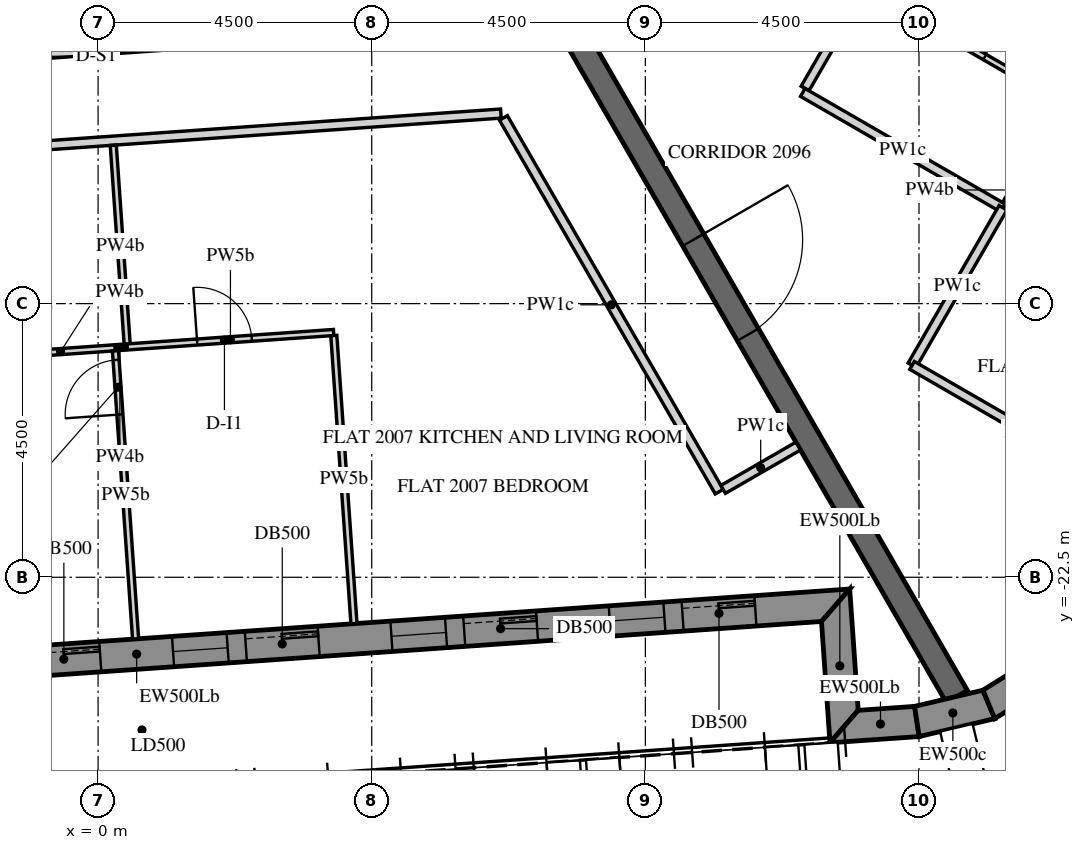
"""IFC4 building model, lengths in metres.
Left out: names, types, materials, properties, quantities, classifications, styles, units other than length and angle.
Written with IfcOpenShell. Run it as: python <this file> out.ifc"""

import sys

from ifc_helpers import new_model, si_unit, direction, frame, frame_2d, origin, place, context, subcontext, project, spatial, polyline, rectangle, outline, extrude, element, fill, save


model = new_model("IFC4")
c1 = context("Model", 3, precision=1e-05, world=origin(), true_north=direction((0.0, 1.0)))
c2 = subcontext(c1, "Body", "Model", "MODEL_VIEW")
j1 = project(units=[si_unit("LENGTHUNIT", "METRE"), si_unit("PLANEANGLEUNIT", "RADIAN")], contexts=[c1])
p1 = place(None, origin())
s1 = spatial("IfcSite", under=j1, at=p1, CompositionType="ELEMENT")
p2 = place(p1, origin())
s2 = spatial("IfcBuilding", under=s1, at=p2, CompositionType="ELEMENT")
p3 = place(p2, frame((0.0, 0.0, 256.2)))
s3 = spatial("IfcBuildingStorey", under=s2, at=p3, CompositionType="ELEMENT", Elevation=256.2)
p4 = place(p3, frame((-10.86, -24.567, 0.0), z_axis=(0.0, 0.0, 1.0), x_axis=(0.997564329317, 0.06975248292, 0.0)))
e1 = element("IfcWall", 1, at=p4, inside=s3, PredefinedType="SOLIDWALL", context=c2, shape_type="SweptSolid", body=[
    extrude(outline(polyline([(0.25, -0.25), (22.795, -0.25), (23.295, 0.25), (-0.25, 0.25), (0.25, -0.25)])), origin(), (0.0, 0.0, 1.0), 3.75),
])
p5 = place(p4, frame((1.323, 0.0, 0.9)))
e2 = element("IfcOpeningElement", 2, at=p5, cuts=e1, PredefinedType="OPENING", context=c2, shape_type="SweptSolid", body=[
    extrude(rectangle(XDim=0.9, YDim=1.5, at=frame_2d((0.45, 0.75))), frame((0.0, 0.26, 0.0), z_axis=(0.0, -1.0, 0.0), x_axis=(1.0, 0.0, 0.0)), (0.0, 0.0, 1.0), 0.52),
])
p6 = place(p4, frame((2.522, 0.0, 0.0)))
e3 = element("IfcOpeningElement", 3, at=p6, cuts=e1, PredefinedType="OPENING", context=c2, shape_type="SweptSolid", body=[
    extrude(rectangle(XDim=1.2, YDim=2.4, at=frame_2d((0.6, 1.2))), frame((0.0, 0.26, 0.0), z_axis=(0.0, -1.0, 0.0), x_axis=(1.0, 0.0, 0.0)), (0.0, 0.0, 1.0), 0.52),
])
p7 = place(p4, frame((4.922, 0.0, 0.9)))
e4 = element("IfcOpeningElement", 4, at=p7, cuts=e1, PredefinedType="OPENING", context=c2, shape_type="SweptSolid", body=[
    extrude(rectangle(XDim=0.9, YDim=1.5, at=frame_2d((0.45, 0.75))), frame((0.0, 0.26, 0.0), z_axis=(0.0, -1.0, 0.0), x_axis=(1.0, 0.0, 0.0)), (0.0, 0.0, 1.0), 0.52),
])
p8 = place(p4, frame((6.122, 0.0, 0.0)))
e5 = element("IfcOpeningElement", 5, at=p8, cuts=e1, PredefinedType="OPENING", context=c2, shape_type="SweptSolid", body=[
    extrude(rectangle(XDim=1.2, YDim=2.4, at=frame_2d((0.6, 1.2))), frame((0.0, 0.26, 0.0), z_axis=(0.0, -1.0, 0.0), x_axis=(1.0, 0.0, 0.0)), (0.0, 0.0, 1.0), 0.52),
])
p9 = place(p4, frame((8.522, 0.0, 0.9)))
e6 = element("IfcOpeningElement", 6, at=p9, cuts=e1, PredefinedType="OPENING", context=c2, shape_type="SweptSolid", body=[
    extrude(rectangle(XDim=0.9, YDim=1.5, at=frame_2d((0.45, 0.75))), frame((0.0, 0.26, 0.0), z_axis=(0.0, -1.0, 0.0), x_axis=(1.0, 0.0, 0.0)), (0.0, 0.0, 1.0), 0.52),
])
p10 = place(p4, frame((9.722, 0.0, 0.0)))
e7 = element("IfcOpeningElement", 7, at=p10, cuts=e1, PredefinedType="OPENING", context=c2, shape_type="SweptSolid", body=[
    extrude(rectangle(XDim=1.2, YDim=2.4, at=frame_2d((0.6, 1.2))), frame((0.0, 0.26, 0.0), z_axis=(0.0, -1.0, 0.0), x_axis=(1.0, 0.0, 0.0)), (0.0, 0.0, 1.0), 0.52),
])
p11 = place(p4, frame((12.122, 0.0, 0.9)))
e8 = element("IfcOpeningElement", 8, at=p11, cuts=e1, PredefinedType="OPENING", context=c2, shape_type="SweptSolid", body=[
    extrude(rectangle(XDim=0.9, YDim=1.5, at=frame_2d((0.45, 0.75))), frame((0.0, 0.26, 0.0), z_axis=(0.0, -1.0, 0.0), x_axis=(1.0, 0.0, 0.0)), (0.0, 0.0, 1.0), 0.52),
])
p12 = place(p4, frame((13.323, 0.0, 0.0)))
e9 = element("IfcOpeningElement", 9, at=p12, cuts=e1, PredefinedType="OPENING", context=c2, shape_type="SweptSolid", body=[
    extrude(rectangle(XDim=1.2, YDim=2.4, at=frame_2d((0.6, 1.2))), frame((0.0, 0.26, 0.0), z_axis=(0.0, -1.0, 0.0), x_axis=(1.0, 0.0, 0.0)), (0.0, 0.0, 1.0), 0.52),
])
p13 = place(p4, frame((15.722, 0.0, 0.9)))
e10 = element("IfcOpeningElement", 10, at=p13, cuts=e1, PredefinedType="OPENING", context=c2, shape_type="SweptSolid", body=[
    extrude(rectangle(XDim=0.9, YDim=1.5, at=frame_2d((0.45, 0.75))), frame((0.0, 0.26, 0.0), z_axis=(0.0, -1.0, 0.0), x_axis=(1.0, 0.0, 0.0)), (0.0, 0.0, 1.0), 0.52),
])
p14 = place(p4, frame((16.922, 0.0, 0.0)))
e11 = element("IfcOpeningElement", 11, at=p14, cuts=e1, PredefinedType="OPENING", context=c2, shape_type="SweptSolid", body=[
    extrude(rectangle(XDim=1.2, YDim=2.4, at=frame_2d((0.6, 1.2))), frame((0.0, 0.26, 0.0), z_axis=(0.0, -1.0, 0.0), x_axis=(1.0, 0.0, 0.0)), (0.0, 0.0, 1.0), 0.52),
])
p15 = place(p4, frame((19.323, 0.0, 0.9)))
e12 = element("IfcOpeningElement", 12, at=p15, cuts=e1, PredefinedType="OPENING", context=c2, shape_type="SweptSolid", body=[
    extrude(rectangle(XDim=0.9, YDim=1.5, at=frame_2d((0.45, 0.75))), frame((0.0, 0.26, 0.0), z_axis=(0.0, -1.0, 0.0), x_axis=(1.0, 0.0, 0.0)), (0.0, 0.0, 1.0), 0.52),
])
p16 = place(p4, frame((20.522, 0.0, 0.0)))
e13 = element("IfcOpeningElement", 13, at=p16, cuts=e1, PredefinedType="OPENING", context=c2, shape_type="SweptSolid", body=[
    extrude(rectangle(XDim=1.2, YDim=2.4, at=frame_2d((0.6, 1.2))), frame((0.0, 0.26, 0.0), z_axis=(0.0, -1.0, 0.0), x_axis=(1.0, 0.0, 0.0)), (0.0, 0.0, 1.0), 0.52),
])
p17 = place(p3, frame((12.129, -22.96, 0.0), z_axis=(0.0, 0.0, 1.0), x_axis=(0.069824268692, -0.99755930726, 0.0)))
e14 = element("IfcWall", 14, at=p17, inside=s3, PredefinedType="SOLIDWALL", context=c2, shape_type="SweptSolid", body=[
    extrude(outline(polyline([(0.25, -0.25), (2.25, -0.25), (1.75, 0.25), (-0.25, 0.25), (0.25, -0.25)])), origin(), (0.0, 0.0, 1.0), 3.75),
])
p18 = place(p3, frame((12.268, -24.955, 0.0), z_axis=(0.0, 0.0, 1.0), x_axis=(0.997561942506, 0.06978660948, 0.0)))
e15 = element("IfcWall", 15, at=p18, inside=s3, PredefinedType="SOLIDWALL", context=c2, shape_type="SweptSolid", body=[
    extrude(outline(polyline([(-0.25, -0.25), (1.22, -0.25), (1.179, 0.25), (0.25, 0.25), (-0.25, -0.25)])), origin(), (0.0, 0.0, 1.0), 3.75),
])
p19 = place(p3, frame((13.465, -24.871, 0.0), z_axis=(0.0, 0.0, 1.0), x_axis=(0.973044740285, 0.230616420501, 0.0)))
e16 = element("IfcWall", 16, at=p19, inside=s3, PredefinedType="SOLIDWALL", context=c2, shape_type="SweptSolid", body=[
    extrude(outline(polyline([(-0.021, -0.25), (1.257, -0.25), (1.175, 0.25), (0.021, 0.25), (-0.021, -0.25)])), origin(), (0.0, 0.0, 1.0), 3.75),
])
p20 = place(p3, frame((14.649, -24.591, 0.0), z_axis=(0.0, 0.0, 1.0), x_axis=(0.848054682072, 0.529908724419, 0.0)))
e17 = element("IfcWall", 17, at=p20, inside=s3, PredefinedType="SOLIDWALL", context=c2, shape_type="SweptSolid", body=[
    extrude(outline(polyline([(-0.041, -0.25), (1.257, -0.25), (1.175, 0.25), (0.041, 0.25), (-0.041, -0.25)])), origin(), (0.0, 0.0, 1.0), 3.75),
])
p21 = place(p3, frame((6.351, -11.0, 0.0), z_axis=(0.0, 0.0, 1.0), x_axis=(0.499998894578, -0.866026041999, 0.0)))
e18 = element("IfcWall", 18, at=p21, inside=s3, PredefinedType="SHEAR", context=c2, shape_type="SweptSolid", body=[
    extrude(rectangle(XDim=15.544, YDim=0.4, at=frame_2d((7.772, 0.0))), origin(), (0.0, 0.0, 1.0), 3.75),
])
p22 = place(p21, frame((6.872, 0.0, 0.0)))
e19 = element("IfcOpeningElement", 19, at=p22, cuts=e18, PredefinedType="OPENING", context=c2, shape_type="SweptSolid", body=[
    extrude(rectangle(XDim=1.8, YDim=2.4, at=frame_2d((0.9, 1.2))), frame((0.0, 0.21, 0.0), z_axis=(0.0, -1.0, 0.0), x_axis=(1.0, 0.0, 0.0)), (0.0, 0.0, 1.0), 0.42),
])
p23 = place(p3, frame((-10.606, -16.079, 0.0), z_axis=(0.0, 0.0, 1.0), x_axis=(0.997563356349, 0.069766396426, 0.0)))
e20 = element("IfcWall", 20, at=p23, inside=s3, PredefinedType="PARTITIONING", context=c2, shape_type="SweptSolid", body=[
    extrude(rectangle(XDim=17.273, YDim=0.15, at=frame_2d((8.636, 0.0))), origin(), (0.0, 0.0, 1.0), 2.823),
])
p24 = place(p23, frame((7.478, 0.0, 0.0)))
e21 = element("IfcOpeningElement", 21, at=p24, cuts=e20, PredefinedType="OPENING", context=c2, shape_type="SweptSolid", body=[
    extrude(rectangle(XDim=1.0, YDim=2.1, at=frame_2d((0.5, 1.05))), frame((0.0, 0.085, 0.0), z_axis=(0.0, -1.0, 0.0), x_axis=(1.0, 0.0, 0.0)), (0.0, 0.0, 1.0), 0.17),
])
p25 = place(p3, frame((6.666, -14.946, 0.0), z_axis=(0.0, 0.0, 1.0), x_axis=(0.499979539361, -0.866037216418, 0.0)))
e22 = element("IfcWall", 22, at=p25, inside=s3, PredefinedType="PARTITIONING", context=c2, shape_type="SweptSolid", body=[
    extrude(rectangle(XDim=7.097, YDim=0.15, at=frame_2d((3.548, 0.0))), origin(), (0.0, 0.0, 1.0), 2.823),
])
p26 = place(p3, frame((10.28, -21.055, 0.0), z_axis=(0.0, 0.0, 1.0), x_axis=(0.866020080793, 0.500009219579, 0.0)))
e23 = element("IfcWall", 23, at=p26, inside=s3, PredefinedType="PARTITIONING", context=c2, shape_type="SweptSolid", body=[
    extrude(rectangle(XDim=1.425, YDim=0.15, at=frame_2d((0.712, 0.0))), origin(), (0.0, 0.0, 1.0), 2.823),
])
p27 = place(p3, frame((7.051, -13.341, 0.0), z_axis=(0.0, 0.0, 1.0), x_axis=(-0.997563599815, -0.069762915103, 0.0)))
e24 = element("IfcWall", 24, at=p27, inside=s3, PredefinedType="PARTITIONING", context=c2, shape_type="SweptSolid", body=[
    extrude(rectangle(XDim=16.952, YDim=0.15, at=frame_2d((8.476, 0.0))), origin(), (0.0, 0.0, 1.0), 2.823),
])
p28 = place(p27, frame((8.026, 0.0, 0.0)))
e25 = element("IfcOpeningElement", 25, at=p28, cuts=e24, PredefinedType="OPENING", context=c2, shape_type="SweptSolid", body=[
    extrude(rectangle(XDim=0.9, YDim=2.1, at=frame_2d((0.45, 1.05))), frame((0.0, 0.085, 0.0), z_axis=(0.0, -1.0, 0.0), x_axis=(1.0, 0.0, 0.0)), (0.0, 0.0, 1.0), 0.17),
])
p29 = place(p3, frame((11.627, -14.462, 0.0), z_axis=(0.0, 0.0, 1.0), x_axis=(0.499994634027, 0.866028501808, 0.0)))
e26 = element("IfcWall", 26, at=p29, inside=s3, PredefinedType="PARTITIONING", context=c2, shape_type="SweptSolid", body=[
    extrude(rectangle(XDim=15.296, YDim=0.15, at=frame_2d((7.648, 0.0))), origin(), (0.0, 0.0, 1.0), 2.823),
])
p30 = place(p29, frame((2.725, 0.0, 0.0)))
e27 = element("IfcOpeningElement", 27, at=p30, cuts=e26, PredefinedType="OPENING", context=c2, shape_type="SweptSolid", body=[
    extrude(rectangle(XDim=1.0, YDim=2.1, at=frame_2d((0.5, 1.05))), frame((0.0, 0.085, 0.0), z_axis=(0.0, -1.0, 0.0), x_axis=(1.0, 0.0, 0.0)), (0.0, 0.0, 1.0), 0.17),
])
p31 = place(p29, frame((13.936, 0.0, 0.0)))
e28 = element("IfcOpeningElement", 28, at=p31, cuts=e26, PredefinedType="OPENING", context=c2, shape_type="SweptSolid", body=[
    extrude(rectangle(XDim=1.0, YDim=2.1, at=frame_2d((0.5, 1.05))), frame((0.0, 0.085, 0.0), z_axis=(0.0, -1.0, 0.0), x_axis=(1.0, 0.0, 0.0)), (0.0, 0.0, 1.0), 0.17),
])
p32 = place(p3, frame((14.88, -16.427, 0.0), z_axis=(0.0, 0.0, 1.0), x_axis=(-0.86601654697, 0.500015340139, 0.0)))
e29 = element("IfcWall", 29, at=p32, inside=s3, PredefinedType="PARTITIONING", context=c2, shape_type="SweptSolid", body=[
    extrude(rectangle(XDim=3.8, YDim=0.15, at=frame_2d((1.9, 0.0))), origin(), (0.0, 0.0, 1.0), 2.823),
])
p33 = place(p3, frame((13.386, -19.014, 0.0), z_axis=(0.0, 0.0, 1.0), x_axis=(0.500009728207, 0.866019787128, 0.0)))
e30 = element("IfcWall", 30, at=p33, inside=s3, PredefinedType="PARTITIONING", context=c2, shape_type="SweptSolid", body=[
    extrude(rectangle(XDim=2.992, YDim=0.15, at=frame_2d((1.496, 0.0))), origin(), (0.0, 0.0, 1.0), 2.823),
])
p34 = place(p3, frame((17.196, -21.216, 0.0), z_axis=(0.0, 0.0, 1.0), x_axis=(-0.866010893236, 0.500025132165, 0.0)))
e31 = element("IfcWall", 31, at=p34, inside=s3, PredefinedType="PARTITIONING", context=c2, shape_type="SweptSolid", body=[
    extrude(rectangle(XDim=4.399, YDim=0.15, at=frame_2d((2.199, 0.0))), origin(), (0.0, 0.0, 1.0), 2.823),
])
p35 = place(p3, frame((0.25, -15.395, 0.0), z_axis=(0.0, 0.0, 1.0), x_axis=(0.069754598287, -0.997564181403, 0.0)))
e32 = element("IfcWall", 32, at=p35, inside=s3, PredefinedType="PARTITIONING", context=c2, shape_type="SweptSolid", body=[
    extrude(rectangle(XDim=3.325, YDim=0.1, at=frame_2d((1.663, 0.0))), origin(), (0.0, 0.0, 1.0), 2.823),
])
p36 = place(p3, frame((0.48, -18.712, 0.0), z_axis=(0.0, 0.0, 1.0), x_axis=(0.997564312984, 0.069752716511, 0.0)))
e33 = element("IfcWall", 33, at=p36, inside=s3, PredefinedType="PARTITIONING", context=c2, shape_type="SweptSolid", body=[
    extrude(rectangle(XDim=3.402, YDim=0.1, at=frame_2d((1.701, 0.0))), origin(), (0.0, 0.0, 1.0), 2.823),
])
p37 = place(p36, frame((1.152, 0.0, 0.0)))
e34 = element("IfcOpeningElement", 34, at=p37, cuts=e33, PredefinedType="OPENING", context=c2, shape_type="SweptSolid", body=[
    extrude(rectangle(XDim=0.9, YDim=2.1, at=frame_2d((0.45, 1.05))), frame((0.0, 0.06, 0.0), z_axis=(0.0, -1.0, 0.0), x_axis=(1.0, 0.0, 0.0)), (0.0, 0.0, 1.0), 0.12),
])
p38 = place(p3, frame((3.877, -18.525, 0.0), z_axis=(0.0, 0.0, 1.0), x_axis=(0.069745758817, -0.997564799463, 0.0)))
e35 = element("IfcWall", 35, at=p38, inside=s3, PredefinedType="PARTITIONING", context=c2, shape_type="SweptSolid", body=[
    extrude(rectangle(XDim=4.75, YDim=0.1, at=frame_2d((2.375, 0.0))), origin(), (0.0, 0.0, 1.0), 2.823),
])
p39 = place(p3, frame((-1.515, -18.852, 0.0), z_axis=(0.0, 0.0, 1.0), x_axis=(0.997562835018, 0.069773850337, 0.0)))
e36 = element("IfcWall", 36, at=p39, inside=s3, PredefinedType="PARTITIONING", context=c2, shape_type="SweptSolid", body=[
    extrude(rectangle(XDim=1.802, YDim=0.1, at=frame_2d((0.901, 0.0))), origin(), (0.0, 0.0, 1.0), 2.823),
])
p40 = place(p3, frame((0.282, -18.726, 0.0), z_axis=(0.0, 0.0, 1.0), x_axis=(0.997611278984, 0.069077753617, 0.0)))
e37 = element("IfcWall", 37, at=p40, inside=s3, PredefinedType="PARTITIONING", context=c2, shape_type="SweptSolid", body=[
    extrude(rectangle(XDim=0.152, YDim=0.1, at=frame_2d((0.076, 0.0))), origin(), (0.0, 0.0, 1.0), 2.823),
])
p41 = place(p3, frame((0.617, -23.514, 0.0), z_axis=(0.0, 0.0, 1.0), x_axis=(-0.069749334994, 0.997564549424, 0.0)))
e38 = element("IfcWall", 38, at=p41, inside=s3, PredefinedType="PARTITIONING", context=c2, shape_type="SweptSolid", body=[
    extrude(rectangle(XDim=4.75, YDim=0.1, at=frame_2d((2.375, 0.0))), origin(), (0.0, 0.0, 1.0), 2.823),
])
p42 = place(p41, frame((3.7, 0.0, 0.0)))
e39 = element("IfcOpeningElement", 39, at=p42, cuts=e38, PredefinedType="OPENING", context=c2, shape_type="SweptSolid", body=[
    extrude(rectangle(XDim=0.9, YDim=2.1, at=frame_2d((0.45, 1.05))), frame((0.0, 0.06, 0.0), z_axis=(0.0, -1.0, 0.0), x_axis=(1.0, 0.0, 0.0)), (0.0, 0.0, 1.0), 0.12),
])
p43 = place(p3, frame((12.654, -12.833, 0.0), z_axis=(0.0, 0.0, 1.0), x_axis=(0.866056803351, -0.499945610411, 0.0)))
e40 = element("IfcWall", 40, at=p43, inside=s3, PredefinedType="PARTITIONING", context=c2, shape_type="SweptSolid", body=[
    extrude(rectangle(XDim=3.725, YDim=0.1, at=frame_2d((1.863, 0.0))), origin(), (0.0, 0.0, 1.0), 2.823),
])
p44 = place(p43, frame((1.425, 0.0, 0.0)))
e41 = element("IfcOpeningElement", 41, at=p44, cuts=e40, PredefinedType="OPENING", context=c2, shape_type="SweptSolid", body=[
    extrude(rectangle(XDim=0.8, YDim=2.1, at=frame_2d((0.4, 1.05))), frame((0.0, 0.06, 0.0), z_axis=(0.0, -1.0, 0.0), x_axis=(1.0, 0.0, 0.0)), (0.0, 0.0, 1.0), 0.12),
])
p45 = place(p3, frame((14.917, -16.364, 0.0), z_axis=(0.0, 0.0, 1.0), x_axis=(0.500141487433, 0.865943700565, 0.0)))
e42 = element("IfcWall", 42, at=p45, inside=s3, PredefinedType="PARTITIONING", context=c2, shape_type="SweptSolid", body=[
    extrude(rectangle(XDim=0.538, YDim=0.1, at=frame_2d((0.269, 0.0))), origin(), (0.0, 0.0, 1.0), 2.823),
])
p46 = place(p10, frame((0.0, 0.175, 0.0)))
e43 = element("IfcDoor", 43, at=p46, inside=s3, OperationType="SLIDING_TO_LEFT", PredefinedType="DOOR", context=c2, shape_type="SweptSolid", body=[
    extrude(rectangle(XDim=1.2, YDim=2.4, at=frame_2d((0.6, 1.2))), frame((0.0, 0.025, 0.0), z_axis=(0.0, -1.0, 0.0), x_axis=(1.0, 0.0, 0.0)), (0.0, 0.0, 1.0), 0.05),
])
fill(e7, e43)
p47 = place(p11, frame((0.0, 0.18, 0.0)))
e44 = element("IfcWindow", 44, at=p47, inside=s3, PartitioningType="SINGLE_PANEL", PredefinedType="WINDOW", context=c2, shape_type="SweptSolid", body=[
    extrude(rectangle(XDim=0.9, YDim=1.5, at=frame_2d((0.45, 0.75))), frame((0.0, 0.03, 0.0), z_axis=(0.0, -1.0, 0.0), x_axis=(1.0, 0.0, 0.0)), (0.0, 0.0, 1.0), 0.06),
])
fill(e8, e44)
p48 = place(p12, frame((0.0, 0.175, 0.0)))
e45 = element("IfcDoor", 45, at=p48, inside=s3, OperationType="SLIDING_TO_LEFT", PredefinedType="DOOR", context=c2, shape_type="SweptSolid", body=[
    extrude(rectangle(XDim=1.2, YDim=2.4, at=frame_2d((0.6, 1.2))), frame((0.0, 0.025, 0.0), z_axis=(0.0, -1.0, 0.0), x_axis=(1.0, 0.0, 0.0)), (0.0, 0.0, 1.0), 0.05),
])
fill(e9, e45)
p49 = place(p13, frame((0.0, 0.18, 0.0)))
e46 = element("IfcWindow", 46, at=p49, inside=s3, PartitioningType="SINGLE_PANEL", PredefinedType="WINDOW", context=c2, shape_type="SweptSolid", body=[
    extrude(rectangle(XDim=0.9, YDim=1.5, at=frame_2d((0.45, 0.75))), frame((0.0, 0.03, 0.0), z_axis=(0.0, -1.0, 0.0), x_axis=(1.0, 0.0, 0.0)), (0.0, 0.0, 1.0), 0.06),
])
fill(e10, e46)
p50 = place(p14, frame((0.0, 0.175, 0.0)))
e47 = element("IfcDoor", 47, at=p50, inside=s3, OperationType="SLIDING_TO_LEFT", PredefinedType="DOOR", context=c2, shape_type="SweptSolid", body=[
    extrude(rectangle(XDim=1.2, YDim=2.4, at=frame_2d((0.6, 1.2))), frame((0.0, 0.025, 0.0), z_axis=(0.0, -1.0, 0.0), x_axis=(1.0, 0.0, 0.0)), (0.0, 0.0, 1.0), 0.05),
])
fill(e11, e47)
p51 = place(p15, frame((0.0, 0.18, 0.0)))
e48 = element("IfcWindow", 48, at=p51, inside=s3, PartitioningType="SINGLE_PANEL", PredefinedType="WINDOW", context=c2, shape_type="SweptSolid", body=[
    extrude(rectangle(XDim=0.9, YDim=1.5, at=frame_2d((0.45, 0.75))), frame((0.0, 0.03, 0.0), z_axis=(0.0, -1.0, 0.0), x_axis=(1.0, 0.0, 0.0)), (0.0, 0.0, 1.0), 0.06),
])
fill(e12, e48)
p52 = place(p16, frame((0.0, 0.175, 0.0)))
e49 = element("IfcDoor", 49, at=p52, inside=s3, OperationType="SLIDING_TO_LEFT", PredefinedType="DOOR", context=c2, shape_type="SweptSolid", body=[
    extrude(rectangle(XDim=1.2, YDim=2.4, at=frame_2d((0.6, 1.2))), frame((0.0, 0.025, 0.0), z_axis=(0.0, -1.0, 0.0), x_axis=(1.0, 0.0, 0.0)), (0.0, 0.0, 1.0), 0.05),
])
fill(e13, e49)
p53 = place(p22, origin())
e50 = element("IfcDoor", 50, at=p53, inside=s3, OperationType="DOUBLE_DOOR_SINGLE_SWING", PredefinedType="DOOR", context=c2, shape_type="SweptSolid", body=[
    extrude(rectangle(XDim=1.8, YDim=2.4, at=frame_2d((0.9, 1.2))), frame((0.0, 0.025, 0.0), z_axis=(0.0, -1.0, 0.0), x_axis=(1.0, 0.0, 0.0)), (0.0, 0.0, 1.0), 0.05),
])
fill(e19, e50)
p54 = place(p42, origin())
e51 = element("IfcDoor", 51, at=p54, inside=s3, OperationType="SINGLE_SWING_RIGHT", PredefinedType="DOOR", context=c2, shape_type="SweptSolid", body=[
    extrude(rectangle(XDim=0.9, YDim=2.1, at=frame_2d((0.45, 1.05))), frame((0.0, 0.025, 0.0), z_axis=(0.0, -1.0, 0.0), x_axis=(1.0, 0.0, 0.0)), (0.0, 0.0, 1.0), 0.05),
])
fill(e39, e51)
p55 = place(p37, origin())
e52 = element("IfcDoor", 52, at=p55, inside=s3, OperationType="SINGLE_SWING_RIGHT", PredefinedType="DOOR", context=c2, shape_type="SweptSolid", body=[
    extrude(rectangle(XDim=0.9, YDim=2.1, at=frame_2d((0.45, 1.05))), frame((0.0, 0.025, 0.0), z_axis=(0.0, -1.0, 0.0), x_axis=(1.0, 0.0, 0.0)), (0.0, 0.0, 1.0), 0.05),
])
fill(e34, e52)
p56 = place(p44, origin())
e53 = element("IfcDoor", 53, at=p56, inside=s3, OperationType="SINGLE_SWING_RIGHT", PredefinedType="DOOR", context=c2, shape_type="SweptSolid", body=[
    extrude(rectangle(XDim=0.8, YDim=2.1, at=frame_2d((0.4, 1.05))), frame((0.0, 0.025, 0.0), z_axis=(0.0, -1.0, 0.0), x_axis=(1.0, 0.0, 0.0)), (0.0, 0.0, 1.0), 0.05),
])
fill(e41, e53)
save(model, sys.argv[1])
